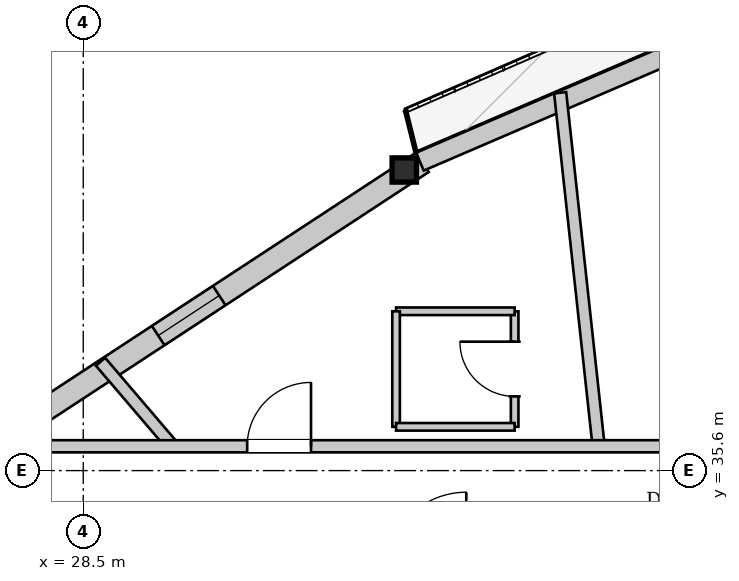
"""IFC4 building model, lengths in metres.
Left out: names, types, materials, properties, quantities, classifications, styles, units other than length and angle.
Written with IfcOpenShell. Run it as: python <this file> out.ifc"""

import sys

from ifc_helpers import new_model, si_unit, direction, frame, frame_2d, origin, origin_2d, place, context, subcontext, project, spatial, rectangle, i_section, extrude, source, transform, mapped, element, fill, save


model = new_model("IFC4")
c1 = context("Model", 3, precision=1e-05, world=origin(), true_north=direction((0.0, 1.0)))
c2 = subcontext(c1, "Body", "Model", "MODEL_VIEW")
j1 = project(units=[si_unit("LENGTHUNIT", "METRE"), si_unit("PLANEANGLEUNIT", "RADIAN")], contexts=[c1])
p1 = place(None, origin())
s1 = spatial("IfcSite", under=j1, at=p1, CompositionType="ELEMENT")
p2 = place(p1, origin())
s2 = spatial("IfcBuilding", under=s1, at=p2, CompositionType="ELEMENT")
p3 = place(p2, frame((0.0, 0.0, 252.5)))
s3 = spatial("IfcBuildingStorey", under=s2, at=p3, CompositionType="ELEMENT", Elevation=252.5)
m1 = source(origin(), c2, "Body", "SweptSolid", [
    extrude(i_section(OverallWidth=0.401, OverallDepth=0.399, WebThickness=0.022, FlangeThickness=0.034, at=origin_2d()), origin(), (0.0, 0.0, 1.0), 3.503),
])
p4 = place(p3, frame((33.973, 40.827, 0.0), z_axis=(-0.110601306067, -0.162034049531, 0.980567344902), x_axis=(0.825934119992, -0.563766644485, 0.0)))
e1 = element("IfcColumn", 1, at=p4, inside=s3, PredefinedType="COLUMN", context=c2, shape_type="MappedRepresentation", body=[
    mapped(m1, transform((0.0, 0.0, 0.0), x_axis=(1.0, 0.0, 0.0), y_axis=(0.0, 1.0, 0.0), z_axis=(0.0, 0.0, 1.0), scale=1.0)),
])
p5 = place(p3, frame((15.575, 28.539, 0.0), z_axis=(0.0, 0.0, 1.0), x_axis=(0.836303758155, 0.5482663806, 0.0)))
e2 = element("IfcWall", 2, at=p5, inside=s3, PredefinedType="SOLIDWALL", context=c2, shape_type="SweptSolid", body=[
    extrude(rectangle(XDim=22.124, YDim=0.38, at=frame_2d((11.062, 0.0))), origin(), (0.0, 0.0, 1.0), 2.872),
])
p6 = place(p5, frame((5.595, 0.0, 0.65)))
e3 = element("IfcOpeningElement", 3, at=p6, cuts=e2, PredefinedType="OPENING", context=c2, shape_type="SweptSolid", body=[
    extrude(rectangle(XDim=1.2, YDim=1.5, at=frame_2d((0.6, 0.75))), frame((0.0, 0.2, 0.0), z_axis=(0.0, -1.0, 0.0), x_axis=(1.0, 0.0, 0.0)), (0.0, 0.0, 1.0), 0.4),
])
p7 = place(p5, frame((16.929, 0.0, 0.65)))
e4 = element("IfcOpeningElement", 4, at=p7, cuts=e2, PredefinedType="OPENING", context=c2, shape_type="SweptSolid", body=[
    extrude(rectangle(XDim=1.2, YDim=1.5, at=frame_2d((0.6, 0.75))), frame((0.0, 0.2, 0.0), z_axis=(0.0, -1.0, 0.0), x_axis=(1.0, 0.0, 0.0)), (0.0, 0.0, 1.0), 0.4),
])
p8 = place(p3, frame((34.037, 40.68, 0.0), z_axis=(0.0, 0.0, 1.0), x_axis=(0.918723841861, 0.394900623444, 0.0)))
e5 = element("IfcWall", 5, at=p8, inside=s3, PredefinedType="SOLIDWALL", context=c2, shape_type="SweptSolid", body=[
    extrude(rectangle(XDim=22.124, YDim=0.32, at=frame_2d((11.062, 0.0))), origin(), (0.0, 0.0, 1.0), 2.872),
])
p9 = place(p8, frame((6.33, 0.0, 0.0)))
e6 = element("IfcOpeningElement", 6, at=p9, cuts=e5, PredefinedType="OPENING", context=c2, shape_type="SweptSolid", body=[
    extrude(rectangle(XDim=1.5, YDim=2.3, at=frame_2d((0.75, 1.15))), frame((0.0, 0.17, 0.0), z_axis=(0.0, -1.0, 0.0), x_axis=(1.0, 0.0, 0.0)), (0.0, 0.0, 1.0), 0.34),
])
p10 = place(p8, frame((17.272, 0.0, 0.402)))
e7 = element("IfcOpeningElement", 7, at=p10, cuts=e5, PredefinedType="OPENING", context=c2, shape_type="SweptSolid", body=[
    extrude(rectangle(XDim=2.6, YDim=2.35, at=frame_2d((1.3, 1.175))), frame((0.0, 0.17, 0.0), z_axis=(0.0, -1.0, 0.0), x_axis=(1.0, 0.0, 0.0)), (0.0, 0.0, 1.0), 0.34),
])
p11 = place(p3, frame((36.977, 36.0, 0.0), z_axis=(0.0, 0.0, 1.0), x_axis=(-0.10825472155, 0.994123189178, 0.0)))
e8 = element("IfcWall", 8, at=p11, inside=s3, PredefinedType="PARTITIONING", context=c2, shape_type="SweptSolid", body=[
    extrude(rectangle(XDim=5.848, YDim=0.2, at=frame_2d((2.924, 0.0))), origin(), (0.0, 0.0, 1.0), 3.38),
])
p12 = place(p3, frame((29.972, 36.0, 0.0), z_axis=(0.0, 0.0, 1.0), x_axis=(-0.649426318999, 0.760424523665, 0.0)))
e9 = element("IfcWall", 9, at=p12, inside=s3, PredefinedType="PARTITIONING", context=c2, shape_type="SweptSolid", body=[
    extrude(rectangle(XDim=1.828, YDim=0.2, at=frame_2d((0.914, 0.0))), origin(), (0.0, 0.0, 1.0), 3.38),
])
p13 = place(p3, frame((35.595, 36.32, 0.0), z_axis=(0.0, 0.0, 1.0), x_axis=(0.0, 1.0, 0.0)))
e10 = element("IfcWall", 10, at=p13, inside=s3, PredefinedType="PARTITIONING", context=c2, shape_type="SweptSolid", body=[
    extrude(rectangle(XDim=1.9, YDim=0.125, at=frame_2d((0.95, 0.0))), origin(), (0.0, 0.0, 1.0), 3.38),
])
p14 = place(p13, frame((0.5, 0.0, 0.0)))
e11 = element("IfcOpeningElement", 11, at=p14, cuts=e10, PredefinedType="OPENING", context=c2, shape_type="SweptSolid", body=[
    extrude(rectangle(XDim=0.9, YDim=2.1, at=frame_2d((0.45, 1.05))), frame((0.0, 0.073, 0.0), z_axis=(0.0, -1.0, 0.0), x_axis=(1.0, 0.0, 0.0)), (0.0, 0.0, 1.0), 0.145),
])
p15 = place(p3, frame((35.595, 38.22, 0.0), z_axis=(0.0, 0.0, 1.0), x_axis=(-1.0, 0.0, 0.0)))
e12 = element("IfcWall", 12, at=p15, inside=s3, PredefinedType="PARTITIONING", context=c2, shape_type="SweptSolid", body=[
    extrude(rectangle(XDim=1.95, YDim=0.125, at=frame_2d((0.975, 0.0))), origin(), (0.0, 0.0, 1.0), 3.125),
])
p16 = place(p3, frame((33.645, 38.22, 0.0), z_axis=(0.0, 0.0, 1.0), x_axis=(0.0, -1.0, 0.0)))
e13 = element("IfcWall", 13, at=p16, inside=s3, PredefinedType="PARTITIONING", context=c2, shape_type="SweptSolid", body=[
    extrude(rectangle(XDim=1.9, YDim=0.125, at=frame_2d((0.95, 0.0))), origin(), (0.0, 0.0, 1.0), 3.38),
])
p17 = place(p3, frame((33.645, 36.32, 0.0), z_axis=(0.0, 0.0, 1.0), x_axis=(1.0, 0.0, 0.0)))
e14 = element("IfcWall", 14, at=p17, inside=s3, PredefinedType="PARTITIONING", context=c2, shape_type="SweptSolid", body=[
    extrude(rectangle(XDim=1.95, YDim=0.125, at=frame_2d((0.975, 0.0))), origin(), (0.0, 0.0, 1.0), 3.38),
])
p18 = place(p3, frame((27.8, 36.0, 0.0), z_axis=(0.0, 0.0, 1.0), x_axis=(1.0, 0.0, 0.0)))
e15 = element("IfcWall", 15, at=p18, inside=s3, PredefinedType="PARTITIONING", context=c2, shape_type="SweptSolid", body=[
    extrude(rectangle(XDim=13.2, YDim=0.2, at=frame_2d((6.6, 0.0))), origin(), (0.0, 0.0, 1.0), 3.38),
])
p19 = place(p18, frame((11.129, 0.0, 0.0)))
e16 = element("IfcOpeningElement", 16, at=p19, cuts=e15, PredefinedType="OPENING", context=c2, shape_type="SweptSolid", body=[
    extrude(rectangle(XDim=1.05, YDim=2.2, at=frame_2d((0.525, 1.1))), frame((0.0, 0.11, 0.0), z_axis=(0.0, -1.0, 0.0), x_axis=(1.0, 0.0, 0.0)), (0.0, 0.0, 1.0), 0.22),
])
p20 = place(p18, frame((3.396, 0.0, 0.0)))
e17 = element("IfcOpeningElement", 17, at=p20, cuts=e15, PredefinedType="OPENING", context=c2, shape_type="SweptSolid", body=[
    extrude(rectangle(XDim=1.05, YDim=2.2, at=frame_2d((0.525, 1.1))), frame((0.0, 0.11, 0.0), z_axis=(0.0, -1.0, 0.0), x_axis=(1.0, 0.0, 0.0)), (0.0, 0.0, 1.0), 0.22),
])
m2 = source(origin(), c2, "Body", "SweptSolid", [
    extrude(rectangle(XDim=1.2, YDim=1.5, at=frame_2d((0.6, 0.75))), frame((0.0, 0.03, 0.0), z_axis=(0.0, -1.0, 0.0), x_axis=(1.0, 0.0, 0.0)), (0.0, 0.0, 1.0), 0.06),
])
p21 = place(p7, origin())
e18 = element("IfcWindow", 18, at=p21, inside=s3, PartitioningType="SINGLE_PANEL", PredefinedType="WINDOW", context=c2, shape_type="MappedRepresentation", body=[
    mapped(m2, transform((0.0, 0.0, 0.0), x_axis=(1.0, 0.0, 0.0), y_axis=(0.0, 1.0, 0.0), z_axis=(0.0, 0.0, 1.0), scale=1.0)),
])
fill(e4, e18)
m3 = source(origin(), c2, "Body", "SweptSolid", [
    extrude(rectangle(XDim=0.9, YDim=2.1, at=frame_2d((0.45, 1.05))), frame((0.0, 0.025, 0.0), z_axis=(0.0, -1.0, 0.0), x_axis=(1.0, 0.0, 0.0)), (0.0, 0.0, 1.0), 0.05),
])
p22 = place(p14, origin())
e19 = element("IfcDoor", 19, at=p22, inside=s3, OperationType="SINGLE_SWING_RIGHT", PredefinedType="DOOR", context=c2, shape_type="MappedRepresentation", body=[
    mapped(m3, transform((0.0, 0.0, 0.0), x_axis=(1.0, 0.0, 0.0), y_axis=(0.0, 1.0, 0.0), z_axis=(0.0, 0.0, 1.0), scale=1.0)),
])
fill(e11, e19)
m4 = source(origin(), c2, "Body", "SweptSolid", [
    extrude(rectangle(XDim=1.05, YDim=2.2, at=frame_2d((0.525, 1.1))), frame((0.0, 0.025, 0.0), z_axis=(0.0, -1.0, 0.0), x_axis=(1.0, 0.0, 0.0)), (0.0, 0.0, 1.0), 0.05),
])
p23 = place(p20, origin())
e20 = element("IfcDoor", 20, at=p23, inside=s3, OperationType="SINGLE_SWING_RIGHT", PredefinedType="DOOR", context=c2, shape_type="MappedRepresentation", body=[
    mapped(m4, transform((0.0, 0.0, 0.0), x_axis=(1.0, 0.0, 0.0), y_axis=(0.0, 1.0, 0.0), z_axis=(0.0, 0.0, 1.0), scale=1.0)),
])
fill(e17, e20)
save(model, sys.argv[1])
